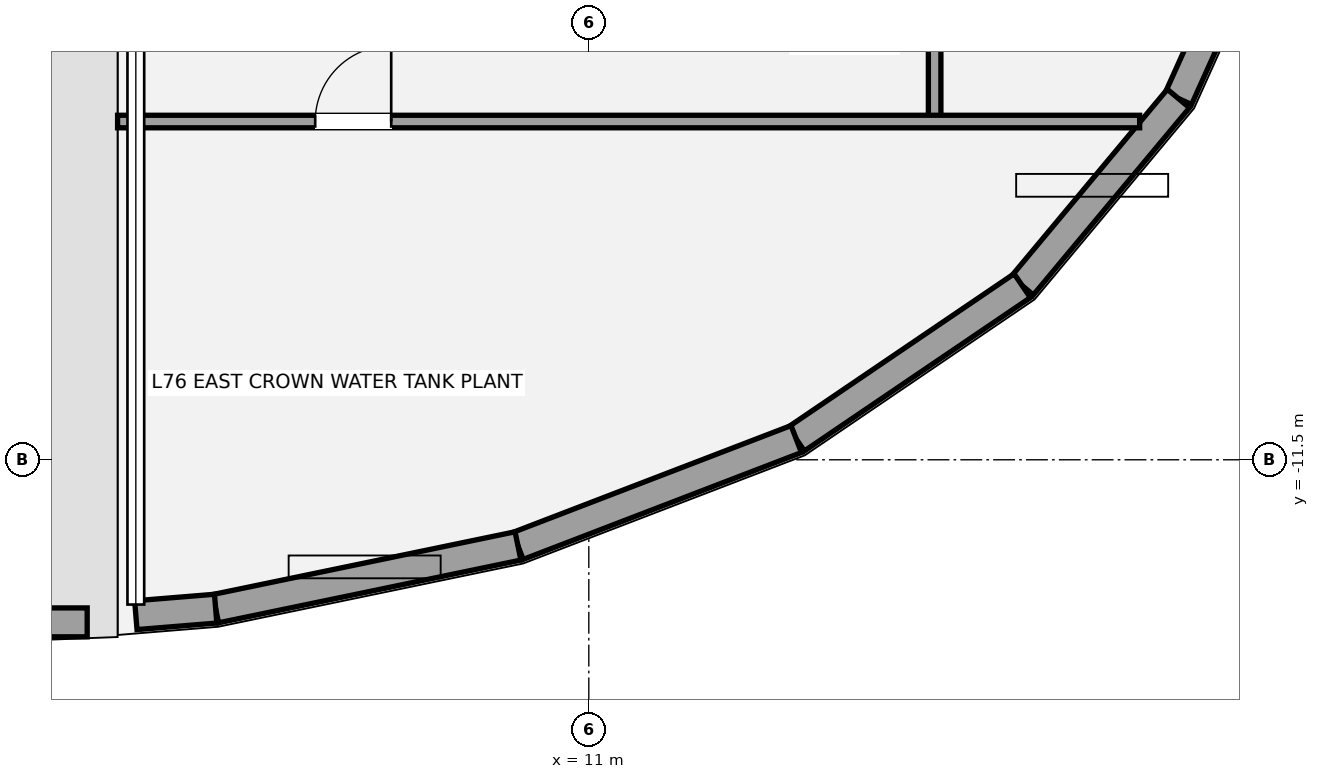
"""IFC4 building model, lengths in metres.
Left out: names, types, materials, properties, quantities, classifications, styles, units other than length and angle.
Written with IfcOpenShell. Run it as: python <this file> out.ifc"""

import sys

from ifc_helpers import new_model, si_unit, direction, frame, frame_2d, origin, place, context, subcontext, project, spatial, rectangle, extrude, element, fill, save


model = new_model("IFC4")
c1 = context("Model", 3, precision=1e-05, world=origin(), true_north=direction((0.0, 1.0)))
c2 = subcontext(c1, "Body", "Model", "MODEL_VIEW")
j1 = project(units=[si_unit("LENGTHUNIT", "METRE"), si_unit("PLANEANGLEUNIT", "RADIAN")], contexts=[c1])
p1 = place(None, origin())
s1 = spatial("IfcSite", under=j1, at=p1, CompositionType="ELEMENT")
p2 = place(p1, origin())
s2 = spatial("IfcBuilding", under=s1, at=p2, CompositionType="ELEMENT")
p3 = place(p2, frame((0.0, 0.0, 269.2)))
s3 = spatial("IfcBuildingStorey", under=s2, at=p3, CompositionType="ELEMENT", Elevation=269.2)
p4 = place(p3, frame((18.758, -6.748, 0.0), z_axis=(0.0, 0.0, 1.0), x_axis=(0.411031522025, 0.911621131777, 0.0)))
e1 = element("IfcWall", 1, at=p4, inside=s3, PredefinedType="ELEMENTEDWALL", context=c2, shape_type="SweptSolid", body=[
    extrude(rectangle(XDim=2.922, YDim=0.38, at=frame_2d((1.461, 0.0))), origin(), (0.0, 0.0, 1.0), 2.97),
])
p5 = place(p3, frame((16.703, -9.21, 0.0), z_axis=(0.0, 0.0, 1.0), x_axis=(0.640685893821, 0.76780309029, 0.0)))
e2 = element("IfcWall", 2, at=p5, inside=s3, PredefinedType="ELEMENTEDWALL", context=c2, shape_type="SweptSolid", body=[
    extrude(rectangle(XDim=3.207, YDim=0.38, at=frame_2d((1.604, 0.0))), origin(), (0.0, 0.0, 1.0), 2.97),
])
p6 = place(p3, frame((13.729, -11.227, 0.0), z_axis=(0.0, 0.0, 1.0), x_axis=(0.827549057152, 0.56139340752, 0.0)))
e3 = element("IfcWall", 3, at=p6, inside=s3, PredefinedType="ELEMENTEDWALL", context=c2, shape_type="SweptSolid", body=[
    extrude(rectangle(XDim=3.593, YDim=0.38, at=frame_2d((1.796, 0.0))), origin(), (0.0, 0.0, 1.0), 2.97),
])
p7 = place(p3, frame((10.068, -12.634, 0.0), z_axis=(0.0, 0.0, 1.0), x_axis=(0.933505951982, 0.358561902068, 0.0)))
e4 = element("IfcWall", 4, at=p7, inside=s3, PredefinedType="ELEMENTEDWALL", context=c2, shape_type="SweptSolid", body=[
    extrude(rectangle(XDim=3.922, YDim=0.38, at=frame_2d((1.961, 0.0))), origin(), (0.0, 0.0, 1.0), 2.97),
])
p8 = place(p3, frame((6.09, -13.459, 0.0), z_axis=(0.0, 0.0, 1.0), x_axis=(0.97915503901, 0.203114277148, 0.0)))
e5 = element("IfcWall", 5, at=p8, inside=s3, PredefinedType="ELEMENTEDWALL", context=c2, shape_type="SweptSolid", body=[
    extrude(rectangle(XDim=4.063, YDim=0.38, at=frame_2d((2.031, 0.0))), origin(), (0.0, 0.0, 1.0), 2.97),
])
p9 = place(p3, frame((5.04, -13.545, 0.0), z_axis=(0.0, 0.0, 1.0), x_axis=(0.99666772043, 0.081568713692, 0.0)))
e6 = element("IfcWall", 6, at=p9, inside=s3, PredefinedType="ELEMENTEDWALL", context=c2, shape_type="SweptSolid", body=[
    extrude(rectangle(XDim=1.053, YDim=0.38, at=frame_2d((0.527, 0.0))), origin(), (0.0, 0.0, 1.0), 2.97),
])
p10 = place(p3, frame((-4.4, -13.639, 0.0), z_axis=(0.0, 0.0, 1.0), x_axis=(1.0, 0.0, 0.0)))
e7 = element("IfcWall", 7, at=p10, inside=s3, PredefinedType="PARAPET", context=c2, shape_type="SweptSolid", body=[
    extrude(rectangle(XDim=8.8, YDim=0.38, at=frame_2d((4.4, 0.0))), origin(), (0.0, 0.0, 1.0), 1.15),
])
p11 = place(p3, frame((15.55, -7.05, 0.0), z_axis=(0.0, 0.0, 1.0), x_axis=(0.0, 1.0, 0.0)))
e8 = element("IfcWall", 8, at=p11, inside=s3, PredefinedType="PARTITIONING", context=c2, shape_type="SweptSolid", body=[
    extrude(rectangle(XDim=14.7, YDim=0.165, at=frame_2d((7.35, 0.0))), origin(), (0.0, 0.0, 1.0), 2.987),
])
p12 = place(p11, frame((3.04, 0.0, 0.0)))
e9 = element("IfcOpeningElement", 9, at=p12, cuts=e8, PredefinedType="OPENING", context=c2, shape_type="SweptSolid", body=[
    extrude(rectangle(XDim=1.0, YDim=2.15, at=frame_2d((0.5, 1.075))), frame((0.0, 0.093, 0.0), z_axis=(0.0, -1.0, 0.0), x_axis=(1.0, 0.0, 0.0)), (0.0, 0.0, 1.0), 0.185),
])
p13 = place(p11, frame((10.2, 0.0, 0.0)))
e10 = element("IfcOpeningElement", 10, at=p13, cuts=e8, PredefinedType="OPENING", context=c2, shape_type="SweptSolid", body=[
    extrude(rectangle(XDim=1.0, YDim=2.15, at=frame_2d((0.5, 1.075))), frame((0.0, 0.093, 0.0), z_axis=(0.0, -1.0, 0.0), x_axis=(1.0, 0.0, 0.0)), (0.0, 0.0, 1.0), 0.185),
])
p14 = place(p3, frame((4.8, -7.05, 0.0), z_axis=(0.0, 0.0, 1.0), x_axis=(1.0, 0.0, 0.0)))
e11 = element("IfcWall", 11, at=p14, inside=s3, PredefinedType="PARTITIONING", context=c2, shape_type="SweptSolid", body=[
    extrude(rectangle(XDim=13.447, YDim=0.165, at=frame_2d((6.724, 0.0))), origin(), (0.0, 0.0, 1.0), 2.968),
])
p15 = place(p14, frame((2.6, 0.0, 0.0)))
e12 = element("IfcOpeningElement", 12, at=p15, cuts=e11, PredefinedType="OPENING", context=c2, shape_type="SweptSolid", body=[
    extrude(rectangle(XDim=1.0, YDim=2.15, at=frame_2d((0.5, 1.075))), frame((0.0, 0.093, 0.0), z_axis=(0.0, -1.0, 0.0), x_axis=(1.0, 0.0, 0.0)), (0.0, 0.0, 1.0), 0.185),
])
p16 = place(p15, origin())
e13 = element("IfcDoor", 13, at=p16, inside=s3, OperationType="SINGLE_SWING_RIGHT", PredefinedType="DOOR", context=c2, shape_type="SweptSolid", body=[
    extrude(rectangle(XDim=1.0, YDim=2.15, at=frame_2d((0.5, 1.075))), frame((0.0, 0.025, 0.0), z_axis=(0.0, -1.0, 0.0), x_axis=(1.0, 0.0, 0.0)), (0.0, 0.0, 1.0), 0.05),
])
fill(e12, e13)
save(model, sys.argv[1])
